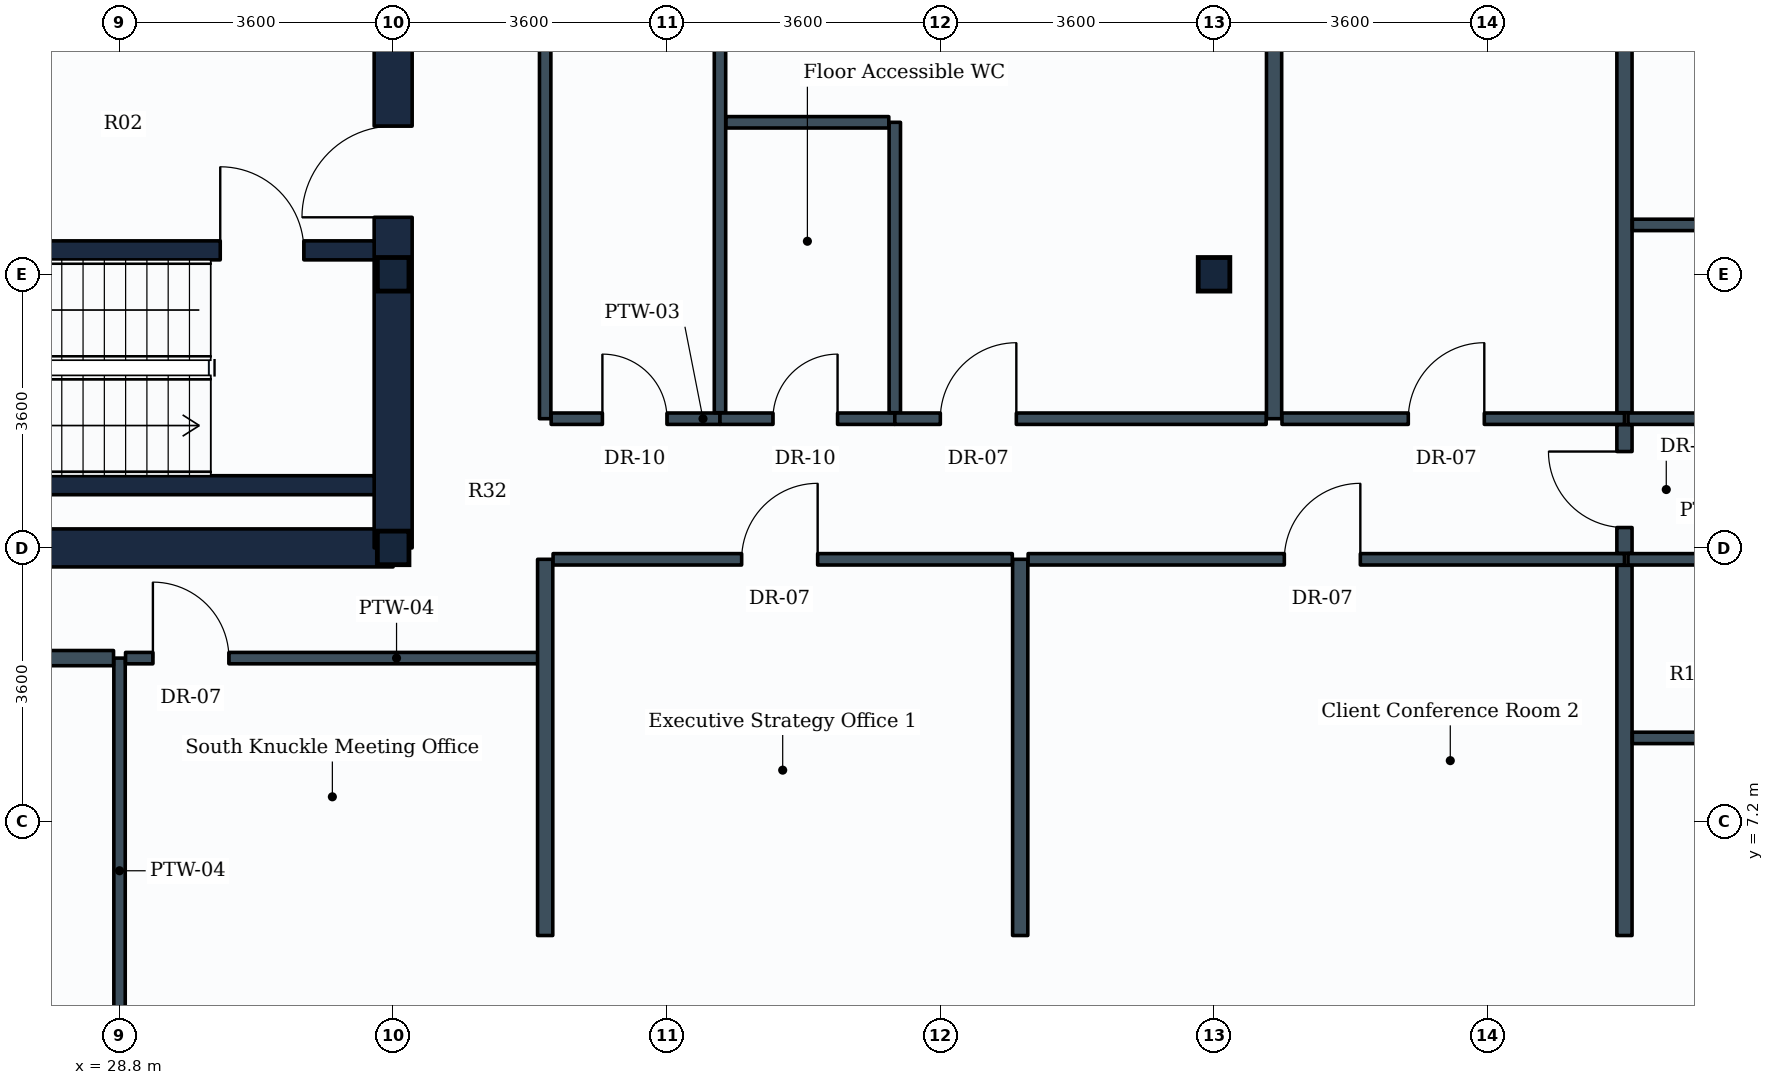
"""IFC4 building model, lengths in metres.
Left out: names, types, materials, properties, quantities, classifications, styles, units other than length and angle.
Written with IfcOpenShell. Run it as: python <this file> out.ifc"""

import sys

from ifc_helpers import new_model, si_unit, direction, frame, frame_2d, origin, origin_2d, place, context, subcontext, project, spatial, rectangle, i_section, extrude, element, fill, save


model = new_model("IFC4")
c1 = context("Model", 3, precision=1e-05, world=origin(), true_north=direction((0.0, 1.0)))
c2 = subcontext(c1, "Body", "Model", "MODEL_VIEW")
j1 = project(units=[si_unit("LENGTHUNIT", "METRE"), si_unit("PLANEANGLEUNIT", "RADIAN")], contexts=[c1])
p1 = place(None, origin())
s1 = spatial("IfcSite", under=j1, at=p1, CompositionType="ELEMENT")
p2 = place(p1, origin())
s2 = spatial("IfcBuilding", under=s1, at=p2, CompositionType="ELEMENT")
p3 = place(p2, frame((0.0, 0.0, 165.6)))
s3 = spatial("IfcBuildingStorey", under=s2, at=p3, CompositionType="ELEMENT", Elevation=165.6)
for number, where, z_axis, x_axis in (
    (1, (32.4, 10.8, 0.0), (0.0, 0.0, 1.0), (1.0, 0.0, 0.0)),
    (2, (32.4, 14.4, 0.0), (0.0, 0.0, 1.0), (1.0, 0.0, 0.0)),
    (3, (43.2, 14.4, 0.0), (0.0, 0.0, 1.0), (1.0, 0.0, 0.0)),
):
    element("IfcColumn", number, at=place(p3, frame(where, z_axis=z_axis, x_axis=x_axis)), inside=s3, PredefinedType="COLUMN", context=c2, shape_type="SweptSolid", body=[
        extrude(i_section(OverallWidth=0.416, OverallDepth=0.442, WebThickness=0.025, FlangeThickness=0.041, FilletRadius=0.015, at=origin_2d()), origin(), (0.0, 0.0, 1.0), 3.8),
    ])
p4 = place(p3, frame((14.4, 10.8, 0.0), z_axis=(0.0, 0.0, 1.0), x_axis=(1.0, 0.0, 0.0)))
e4 = element("IfcWall", 4, at=p4, inside=s3, PredefinedType="SHEAR", context=c2, shape_type="SweptSolid", body=[
    extrude(rectangle(XDim=18.0, YDim=0.5, at=frame_2d((9.0, 0.0))), origin(), (0.0, 0.0, 1.0), 3.48),
])
p5 = place(p3, frame((32.4, 10.8, 0.0), z_axis=(0.0, 0.0, 1.0), x_axis=(0.0, 1.0, 0.0)))
e5 = element("IfcWall", 5, at=p5, inside=s3, PredefinedType="SHEAR", context=c2, shape_type="SweptSolid", body=[
    extrude(rectangle(XDim=14.4, YDim=0.5, at=frame_2d((7.2, 0.0))), origin(), (0.0, 0.0, 1.0), 3.48),
])
p6 = place(p5, frame((4.35, 0.0, 0.0)))
e6 = element("IfcOpeningElement", 6, at=p6, cuts=e5, PredefinedType="OPENING", context=c2, shape_type="SweptSolid", body=[
    extrude(rectangle(XDim=1.2, YDim=2.1, at=frame_2d((0.6, 1.05))), frame((0.0, 0.26, 0.0), z_axis=(0.0, -1.0, 0.0), x_axis=(1.0, 0.0, 0.0)), (0.0, 0.0, 1.0), 0.52),
])
p7 = place(p5, frame((10.0, 0.0, 0.0)))
e7 = element("IfcOpeningElement", 7, at=p7, cuts=e5, PredefinedType="OPENING", context=c2, shape_type="SweptSolid", body=[
    extrude(rectangle(XDim=1.2, YDim=2.1, at=frame_2d((0.6, 1.05))), frame((0.0, 0.26, 0.0), z_axis=(0.0, -1.0, 0.0), x_axis=(1.0, 0.0, 0.0)), (0.0, 0.0, 1.0), 0.52),
])
p8 = place(p3, frame((23.35, 11.625, 0.0), z_axis=(0.0, 0.0, 1.0), x_axis=(1.0, 0.0, 0.0)))
e8 = element("IfcWall", 8, at=p8, inside=s3, PredefinedType="SHEAR", context=c2, shape_type="SweptSolid", body=[
    extrude(rectangle(XDim=8.8, YDim=0.25, at=frame_2d((4.4, 0.0))), origin(), (0.0, 0.0, 1.0), 3.48),
])
p9 = place(p3, frame((23.35, 14.715, 0.0), z_axis=(0.0, 0.0, 1.0), x_axis=(1.0, 0.0, 0.0)))
e9 = element("IfcWall", 9, at=p9, inside=s3, PredefinedType="SHEAR", context=c2, shape_type="SweptSolid", body=[
    extrude(rectangle(XDim=8.8, YDim=0.25, at=frame_2d((4.4, 0.0))), origin(), (0.0, 0.0, 1.0), 3.48),
])
p10 = place(p9, frame((6.775, 0.0, 0.0)))
e10 = element("IfcOpeningElement", 10, at=p10, cuts=e9, PredefinedType="OPENING", context=c2, shape_type="SweptSolid", body=[
    extrude(rectangle(XDim=1.1, YDim=2.1, at=frame_2d((0.55, 1.05))), frame((0.0, 0.135, 0.0), z_axis=(0.0, -1.0, 0.0), x_axis=(1.0, 0.0, 0.0)), (0.0, 0.0, 1.0), 0.27),
])
p11 = place(p3, frame((34.4, 12.5, 0.0), z_axis=(0.0, 0.0, 1.0), x_axis=(0.0, 1.0, 0.0)))
e11 = element("IfcWall", 11, at=p11, inside=s3, PredefinedType="PARTITIONING", context=c2, shape_type="SweptSolid", body=[
    extrude(rectangle(XDim=12.546, YDim=0.15, at=frame_2d((6.273, 0.0))), origin(), (0.0, 0.0, 1.0), 2.93),
])
p12 = place(p3, frame((34.479, 12.5, 0.0), z_axis=(0.0, 0.0, 1.0), x_axis=(1.0, 0.0, 0.0)))
e12 = element("IfcWall", 12, at=p12, inside=s3, PredefinedType="PARTITIONING", context=c2, shape_type="SweptSolid", body=[
    extrude(rectangle(XDim=2.221, YDim=0.15, at=frame_2d((1.11, 0.0))), origin(), (0.0, 0.0, 1.0), 3.15),
])
p13 = place(p12, frame((0.674, 0.0, 0.0)))
e13 = element("IfcOpeningElement", 13, at=p13, cuts=e12, PredefinedType="OPENING", context=c2, shape_type="SweptSolid", body=[
    extrude(rectangle(XDim=0.85, YDim=2.1, at=frame_2d((0.425, 1.05))), frame((0.0, 0.085, 0.0), z_axis=(0.0, -1.0, 0.0), x_axis=(1.0, 0.0, 0.0)), (0.0, 0.0, 1.0), 0.17),
])
p14 = place(p3, frame((36.7, 12.579, 0.0), z_axis=(0.0, 0.0, 1.0), x_axis=(0.0, 1.0, 0.0)))
e14 = element("IfcWall", 14, at=p14, inside=s3, PredefinedType="PARTITIONING", context=c2, shape_type="SweptSolid", body=[
    extrude(rectangle(XDim=12.467, YDim=0.15, at=frame_2d((6.233, 0.0))), origin(), (0.0, 0.0, 1.0), 2.93),
])
p15 = place(p3, frame((36.7, 12.5, 0.0), z_axis=(0.0, 0.0, 1.0), x_axis=(1.0, 0.0, 0.0)))
e15 = element("IfcWall", 15, at=p15, inside=s3, PredefinedType="PARTITIONING", context=c2, shape_type="SweptSolid", body=[
    extrude(rectangle(XDim=2.3, YDim=0.15, at=frame_2d((1.15, 0.0))), origin(), (0.0, 0.0, 1.0), 3.465),
])
p16 = place(p15, frame((0.697, 0.0, 0.0)))
e16 = element("IfcOpeningElement", 16, at=p16, cuts=e15, PredefinedType="OPENING", context=c2, shape_type="SweptSolid", body=[
    extrude(rectangle(XDim=0.85, YDim=2.1, at=frame_2d((0.425, 1.05))), frame((0.0, 0.085, 0.0), z_axis=(0.0, -1.0, 0.0), x_axis=(1.0, 0.0, 0.0)), (0.0, 0.0, 1.0), 0.17),
])
p17 = place(p3, frame((39.0, 12.579, 0.0), z_axis=(0.0, 0.0, 1.0), x_axis=(0.0, 1.0, 0.0)))
e17 = element("IfcWall", 17, at=p17, inside=s3, PredefinedType="PARTITIONING", context=c2, shape_type="SweptSolid", body=[
    extrude(rectangle(XDim=3.821, YDim=0.15, at=frame_2d((1.91, 0.0))), origin(), (0.0, 0.0, 1.0), 3.1),
])
p18 = place(p3, frame((36.779, 16.4, 0.0), z_axis=(0.0, 0.0, 1.0), x_axis=(1.0, 0.0, 0.0)))
e18 = element("IfcWall", 18, at=p18, inside=s3, PredefinedType="PARTITIONING", context=c2, shape_type="SweptSolid", body=[
    extrude(rectangle(XDim=2.142, YDim=0.15, at=frame_2d((1.071, 0.0))), origin(), (0.0, 0.0, 1.0), 3.465),
])
p19 = place(p3, frame((28.8, 9.35, 0.0), z_axis=(0.0, 0.0, 1.0), x_axis=(0.0, -1.0, 0.0)))
e19 = element("IfcWall", 19, at=p19, inside=s3, PredefinedType="PARTITIONING", context=c2, shape_type="SweptSolid", body=[
    extrude(rectangle(XDim=5.596, YDim=0.15, at=frame_2d((2.798, 0.0))), origin(), (0.0, 0.0, 1.0), 3.465),
])
p20 = place(p3, frame((12.95, 9.35, 0.0), z_axis=(0.0, 0.0, 1.0), x_axis=(1.0, 0.0, 0.0)))
e20 = element("IfcWall", 20, at=p20, inside=s3, PredefinedType="PARTITIONING", context=c2, shape_type="SweptSolid", body=[
    extrude(rectangle(XDim=15.771, YDim=0.2, at=frame_2d((7.885, 0.0))), origin(), (0.0, 0.0, 1.0), 3.1),
])
p21 = place(p20, frame((4.836, 0.0, 0.0)))
e21 = element("IfcOpeningElement", 21, at=p21, cuts=e20, PredefinedType="OPENING", context=c2, shape_type="SweptSolid", body=[
    extrude(rectangle(XDim=1.0, YDim=2.1, at=frame_2d((0.5, 1.05))), frame((0.0, 0.11, 0.0), z_axis=(0.0, -1.0, 0.0), x_axis=(1.0, 0.0, 0.0)), (0.0, 0.0, 1.0), 0.22),
])
p22 = place(p3, frame((28.879, 9.35, 0.0), z_axis=(0.0, 0.0, 1.0), x_axis=(1.0, 0.0, 0.0)))
e22 = element("IfcWall", 22, at=p22, inside=s3, PredefinedType="PARTITIONING", context=c2, shape_type="SweptSolid", body=[
    extrude(rectangle(XDim=5.521, YDim=0.15, at=frame_2d((2.76, 0.0))), origin(), (0.0, 0.0, 1.0), 3.465),
])
p23 = place(p22, frame((0.36, 0.0, 0.0)))
e23 = element("IfcOpeningElement", 23, at=p23, cuts=e22, PredefinedType="OPENING", context=c2, shape_type="SweptSolid", body=[
    extrude(rectangle(XDim=1.0, YDim=2.1, at=frame_2d((0.5, 1.05))), frame((0.0, 0.085, 0.0), z_axis=(0.0, -1.0, 0.0), x_axis=(1.0, 0.0, 0.0)), (0.0, 0.0, 1.0), 0.17),
])
p24 = place(p3, frame((34.4, 5.7, 0.0), z_axis=(0.0, 0.0, 1.0), x_axis=(0.0, 1.0, 0.0)))
e24 = element("IfcWall", 24, at=p24, inside=s3, PredefinedType="PARTITIONING", context=c2, shape_type="SweptSolid", body=[
    extrude(rectangle(XDim=4.95, YDim=0.2, at=frame_2d((2.475, 0.0))), origin(), (0.0, 0.0, 1.0), 3.465),
])
p25 = place(p3, frame((40.65, 5.7, 0.0), z_axis=(0.0, 0.0, 1.0), x_axis=(0.0, 1.0, 0.0)))
e25 = element("IfcWall", 25, at=p25, inside=s3, PredefinedType="PARTITIONING", context=c2, shape_type="SweptSolid", body=[
    extrude(rectangle(XDim=4.95, YDim=0.2, at=frame_2d((2.475, 0.0))), origin(), (0.0, 0.0, 1.0), 3.13),
])
p26 = place(p3, frame((34.504, 10.65, 0.0), z_axis=(0.0, 0.0, 1.0), x_axis=(1.0, 0.0, 0.0)))
e26 = element("IfcWall", 26, at=p26, inside=s3, PredefinedType="PARTITIONING", context=c2, shape_type="SweptSolid", body=[
    extrude(rectangle(XDim=6.042, YDim=0.15, at=frame_2d((3.021, 0.0))), origin(), (0.0, 0.0, 1.0), 3.1),
])
p27 = place(p26, frame((2.481, 0.0, 0.0)))
e27 = element("IfcOpeningElement", 27, at=p27, cuts=e26, PredefinedType="OPENING", context=c2, shape_type="SweptSolid", body=[
    extrude(rectangle(XDim=1.0, YDim=2.1, at=frame_2d((0.5, 1.05))), frame((0.0, 0.085, 0.0), z_axis=(0.0, -1.0, 0.0), x_axis=(1.0, 0.0, 0.0)), (0.0, 0.0, 1.0), 0.17),
])
p28 = place(p3, frame((40.754, 10.65, 0.0), z_axis=(0.0, 0.0, 1.0), x_axis=(1.0, 0.0, 0.0)))
e28 = element("IfcWall", 28, at=p28, inside=s3, PredefinedType="PARTITIONING", context=c2, shape_type="SweptSolid", body=[
    extrude(rectangle(XDim=7.846, YDim=0.15, at=frame_2d((3.923, 0.0))), origin(), (0.0, 0.0, 1.0), 3.1),
])
p29 = place(p28, frame((3.371, 0.0, 0.0)))
e29 = element("IfcOpeningElement", 29, at=p29, cuts=e28, PredefinedType="OPENING", context=c2, shape_type="SweptSolid", body=[
    extrude(rectangle(XDim=1.0, YDim=2.1, at=frame_2d((0.5, 1.05))), frame((0.0, 0.085, 0.0), z_axis=(0.0, -1.0, 0.0), x_axis=(1.0, 0.0, 0.0)), (0.0, 0.0, 1.0), 0.17),
])
p30 = place(p3, frame((43.99, 12.5, 0.0), z_axis=(0.0, 0.0, 1.0), x_axis=(0.0, 1.0, 0.0)))
e30 = element("IfcWall", 30, at=p30, inside=s3, PredefinedType="PARTITIONING", context=c2, shape_type="SweptSolid", body=[
    extrude(rectangle(XDim=12.546, YDim=0.2, at=frame_2d((6.273, 0.0))), origin(), (0.0, 0.0, 1.0), 2.93),
])
p31 = place(p3, frame((39.0, 12.5, 0.0), z_axis=(0.0, 0.0, 1.0), x_axis=(1.0, 0.0, 0.0)))
e31 = element("IfcWall", 31, at=p31, inside=s3, PredefinedType="PARTITIONING", context=c2, shape_type="SweptSolid", body=[
    extrude(rectangle(XDim=4.886, YDim=0.15, at=frame_2d((2.443, 0.0))), origin(), (0.0, 0.0, 1.0), 3.1),
])
p32 = place(p31, frame((0.599, 0.0, 0.0)))
e32 = element("IfcOpeningElement", 32, at=p32, cuts=e31, PredefinedType="OPENING", context=c2, shape_type="SweptSolid", body=[
    extrude(rectangle(XDim=1.0, YDim=2.1, at=frame_2d((0.5, 1.05))), frame((0.0, 0.085, 0.0), z_axis=(0.0, -1.0, 0.0), x_axis=(1.0, 0.0, 0.0)), (0.0, 0.0, 1.0), 0.17),
])
p33 = place(p3, frame((44.094, 12.5, 0.0), z_axis=(0.0, 0.0, 1.0), x_axis=(1.0, 0.0, 0.0)))
e33 = element("IfcWall", 33, at=p33, inside=s3, PredefinedType="PARTITIONING", context=c2, shape_type="SweptSolid", body=[
    extrude(rectangle(XDim=4.506, YDim=0.15, at=frame_2d((2.253, 0.0))), origin(), (0.0, 0.0, 1.0), 3.1),
])
p34 = place(p33, frame((1.662, 0.0, 0.0)))
e34 = element("IfcOpeningElement", 34, at=p34, cuts=e33, PredefinedType="OPENING", context=c2, shape_type="SweptSolid", body=[
    extrude(rectangle(XDim=1.0, YDim=2.1, at=frame_2d((0.5, 1.05))), frame((0.0, 0.085, 0.0), z_axis=(0.0, -1.0, 0.0), x_axis=(1.0, 0.0, 0.0)), (0.0, 0.0, 1.0), 0.17),
])
p35 = place(p3, frame((48.6, 5.7, 0.0), z_axis=(0.0, 0.0, 1.0), x_axis=(0.0, 1.0, 0.0)))
e35 = element("IfcWall", 35, at=p35, inside=s3, PredefinedType="PARTITIONING", context=c2, shape_type="SweptSolid", body=[
    extrude(rectangle(XDim=4.871, YDim=0.2, at=frame_2d((2.436, 0.0))), origin(), (0.0, 0.0, 1.0), 3.465),
])
p36 = place(p3, frame((48.6, 12.579, 0.0), z_axis=(0.0, 0.0, 1.0), x_axis=(0.0, 1.0, 0.0)))
e36 = element("IfcWall", 36, at=p36, inside=s3, PredefinedType="PARTITIONING", context=c2, shape_type="SweptSolid", body=[
    extrude(rectangle(XDim=12.467, YDim=0.2, at=frame_2d((6.233, 0.0))), origin(), (0.0, 0.0, 1.0), 2.93),
])
p37 = place(p3, frame((48.6, 10.729, 0.0), z_axis=(0.0, 0.0, 1.0), x_axis=(0.0, 1.0, 0.0)))
e37 = element("IfcWall", 37, at=p37, inside=s3, PredefinedType="PARTITIONING", context=c2, shape_type="SweptSolid", body=[
    extrude(rectangle(XDim=1.692, YDim=0.2, at=frame_2d((0.846, 0.0))), origin(), (0.0, 0.0, 1.0), 3.465),
])
p38 = place(p37, frame((0.339, 0.0, 0.0)))
e38 = element("IfcOpeningElement", 38, at=p38, cuts=e37, PredefinedType="OPENING", context=c2, shape_type="SweptSolid", body=[
    extrude(rectangle(XDim=1.0, YDim=2.1, at=frame_2d((0.5, 1.05))), frame((0.0, 0.11, 0.0), z_axis=(0.0, -1.0, 0.0), x_axis=(1.0, 0.0, 0.0)), (0.0, 0.0, 1.0), 0.22),
])
p39 = place(p3, frame((48.646, 10.65, 0.0), z_axis=(0.0, 0.0, 1.0), x_axis=(1.0, 0.0, 0.0)))
e39 = element("IfcWall", 39, at=p39, inside=s3, PredefinedType="PARTITIONING", context=c2, shape_type="SweptSolid", body=[
    extrude(rectangle(XDim=2.354, YDim=0.15, at=frame_2d((1.177, 0.0))), origin(), (0.0, 0.0, 1.0), 3.465),
])
p40 = place(p3, frame((48.704, 8.3, 0.0), z_axis=(0.0, 0.0, 1.0), x_axis=(1.0, 0.0, 0.0)))
e40 = element("IfcWall", 40, at=p40, inside=s3, PredefinedType="PARTITIONING", context=c2, shape_type="SweptSolid", body=[
    extrude(rectangle(XDim=2.217, YDim=0.15, at=frame_2d((1.108, 0.0))), origin(), (0.0, 0.0, 1.0), 3.465),
])
p41 = place(p3, frame((48.646, 12.5, 0.0), z_axis=(0.0, 0.0, 1.0), x_axis=(1.0, 0.0, 0.0)))
e41 = element("IfcWall", 41, at=p41, inside=s3, PredefinedType="PARTITIONING", context=c2, shape_type="SweptSolid", body=[
    extrude(rectangle(XDim=3.054, YDim=0.15, at=frame_2d((1.527, 0.0))), origin(), (0.0, 0.0, 1.0), 3.465),
])
p42 = place(p3, frame((48.704, 15.05, 0.0), z_axis=(0.0, 0.0, 1.0), x_axis=(1.0, 0.0, 0.0)))
e42 = element("IfcWall", 42, at=p42, inside=s3, PredefinedType="PARTITIONING", context=c2, shape_type="SweptSolid", body=[
    extrude(rectangle(XDim=2.996, YDim=0.15, at=frame_2d((1.498, 0.0))), origin(), (0.0, 0.0, 1.0), 3.465),
])
p43 = place(p42, frame((1.021, 0.0, 0.0)))
e43 = element("IfcOpeningElement", 43, at=p43, cuts=e42, PredefinedType="OPENING", context=c2, shape_type="SweptSolid", body=[
    extrude(rectangle(XDim=0.85, YDim=2.1, at=frame_2d((0.425, 1.05))), frame((0.0, 0.085, 0.0), z_axis=(0.0, -1.0, 0.0), x_axis=(1.0, 0.0, 0.0)), (0.0, 0.0, 1.0), 0.17),
])
p44 = place(p10, origin())
e44 = element("IfcDoor", 44, at=p44, inside=s3, OperationType="SINGLE_SWING_LEFT", PredefinedType="DOOR", context=c2, shape_type="SweptSolid", body=[
    extrude(rectangle(XDim=1.1, YDim=2.1, at=frame_2d((0.55, 1.05))), frame((0.0, 0.025, 0.0), z_axis=(0.0, -1.0, 0.0), x_axis=(1.0, 0.0, 0.0)), (0.0, 0.0, 1.0), 0.05),
])
fill(e10, e44)
p45 = place(p6, origin())
e45 = element("IfcDoor", 45, at=p45, inside=s3, OperationType="SINGLE_SWING_LEFT", PredefinedType="DOOR", context=c2, shape_type="SweptSolid", body=[
    extrude(rectangle(XDim=1.2, YDim=2.1, at=frame_2d((0.6, 1.05))), frame((0.0, 0.025, 0.0), z_axis=(0.0, -1.0, 0.0), x_axis=(1.0, 0.0, 0.0)), (0.0, 0.0, 1.0), 0.05),
])
fill(e6, e45)
p46 = place(p13, origin())
e46 = element("IfcDoor", 46, at=p46, inside=s3, OperationType="SINGLE_SWING_LEFT", PredefinedType="DOOR", context=c2, shape_type="SweptSolid", body=[
    extrude(rectangle(XDim=0.85, YDim=2.1, at=frame_2d((0.425, 1.05))), frame((0.0, 0.025, 0.0), z_axis=(0.0, -1.0, 0.0), x_axis=(1.0, 0.0, 0.0)), (0.0, 0.0, 1.0), 0.05),
])
fill(e13, e46)
p47 = place(p16, origin())
e47 = element("IfcDoor", 47, at=p47, inside=s3, OperationType="SINGLE_SWING_RIGHT", PredefinedType="DOOR", context=c2, shape_type="SweptSolid", body=[
    extrude(rectangle(XDim=0.85, YDim=2.1, at=frame_2d((0.425, 1.05))), frame((0.0, 0.025, 0.0), z_axis=(0.0, -1.0, 0.0), x_axis=(1.0, 0.0, 0.0)), (0.0, 0.0, 1.0), 0.05),
])
fill(e16, e47)
p48 = place(p23, origin())
e48 = element("IfcDoor", 48, at=p48, inside=s3, OperationType="SINGLE_SWING_LEFT", PredefinedType="DOOR", context=c2, shape_type="SweptSolid", body=[
    extrude(rectangle(XDim=1.0, YDim=2.1, at=frame_2d((0.5, 1.05))), frame((0.0, 0.025, 0.0), z_axis=(0.0, -1.0, 0.0), x_axis=(1.0, 0.0, 0.0)), (0.0, 0.0, 1.0), 0.05),
])
fill(e23, e48)
p49 = place(p27, origin())
e49 = element("IfcDoor", 49, at=p49, inside=s3, OperationType="SINGLE_SWING_RIGHT", PredefinedType="DOOR", context=c2, shape_type="SweptSolid", body=[
    extrude(rectangle(XDim=1.0, YDim=2.1, at=frame_2d((0.5, 1.05))), frame((0.0, 0.025, 0.0), z_axis=(0.0, -1.0, 0.0), x_axis=(1.0, 0.0, 0.0)), (0.0, 0.0, 1.0), 0.05),
])
fill(e27, e49)
p50 = place(p29, origin())
e50 = element("IfcDoor", 50, at=p50, inside=s3, OperationType="SINGLE_SWING_RIGHT", PredefinedType="DOOR", context=c2, shape_type="SweptSolid", body=[
    extrude(rectangle(XDim=1.0, YDim=2.1, at=frame_2d((0.5, 1.05))), frame((0.0, 0.025, 0.0), z_axis=(0.0, -1.0, 0.0), x_axis=(1.0, 0.0, 0.0)), (0.0, 0.0, 1.0), 0.05),
])
fill(e29, e50)
p51 = place(p32, origin())
e51 = element("IfcDoor", 51, at=p51, inside=s3, OperationType="SINGLE_SWING_RIGHT", PredefinedType="DOOR", context=c2, shape_type="SweptSolid", body=[
    extrude(rectangle(XDim=1.0, YDim=2.1, at=frame_2d((0.5, 1.05))), frame((0.0, 0.025, 0.0), z_axis=(0.0, -1.0, 0.0), x_axis=(1.0, 0.0, 0.0)), (0.0, 0.0, 1.0), 0.05),
])
fill(e32, e51)
p52 = place(p34, origin())
e52 = element("IfcDoor", 52, at=p52, inside=s3, OperationType="SINGLE_SWING_RIGHT", PredefinedType="DOOR", context=c2, shape_type="SweptSolid", body=[
    extrude(rectangle(XDim=1.0, YDim=2.1, at=frame_2d((0.5, 1.05))), frame((0.0, 0.025, 0.0), z_axis=(0.0, -1.0, 0.0), x_axis=(1.0, 0.0, 0.0)), (0.0, 0.0, 1.0), 0.05),
])
fill(e34, e52)
p53 = place(p38, origin())
e53 = element("IfcDoor", 53, at=p53, inside=s3, OperationType="SINGLE_SWING_RIGHT", PredefinedType="DOOR", context=c2, shape_type="SweptSolid", body=[
    extrude(rectangle(XDim=1.0, YDim=2.1, at=frame_2d((0.5, 1.05))), frame((0.0, 0.025, 0.0), z_axis=(0.0, -1.0, 0.0), x_axis=(1.0, 0.0, 0.0)), (0.0, 0.0, 1.0), 0.05),
])
fill(e38, e53)
save(model, sys.argv[1])
